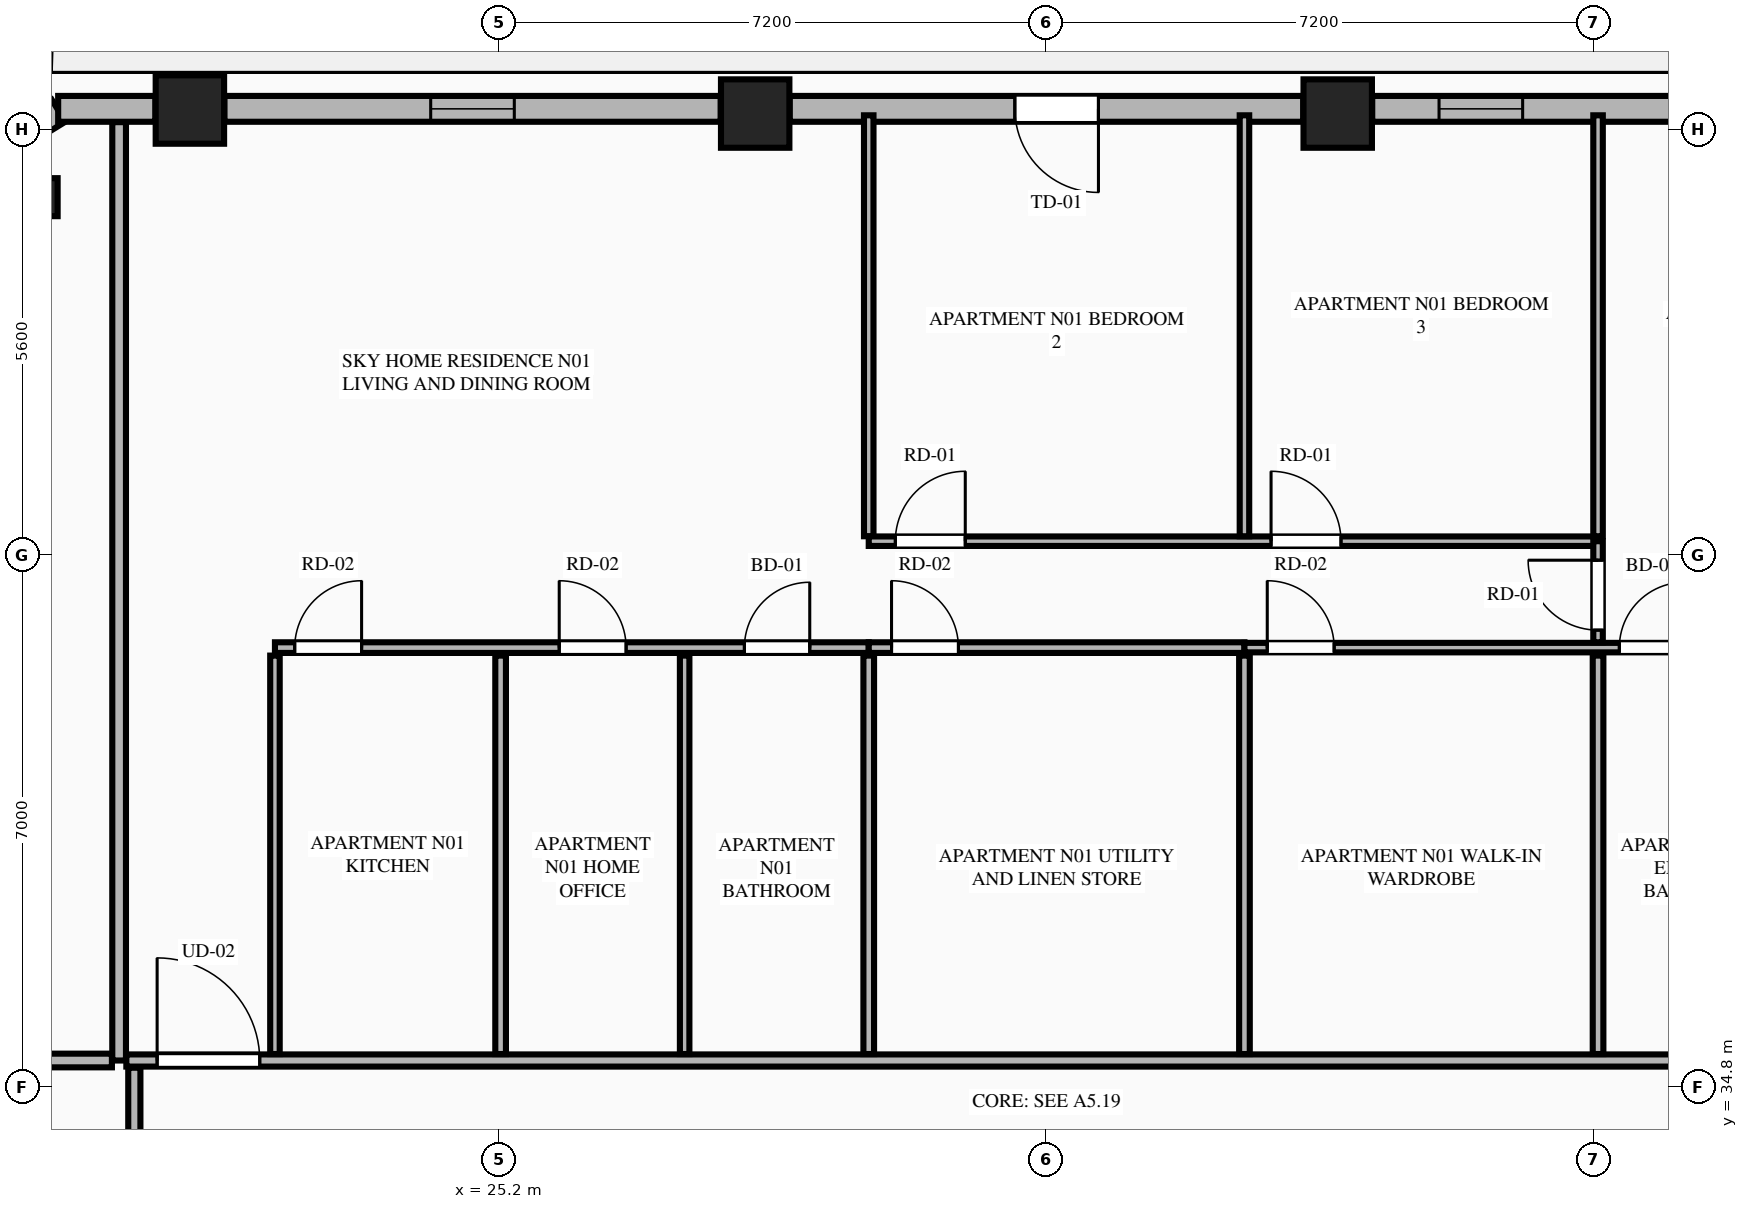
"""IFC4 building model, lengths in metres.
Left out: names, types, materials, properties, quantities, classifications, styles, units other than length and angle.
Written with IfcOpenShell. Run it as: python <this file> out.ifc"""

import sys

from ifc_helpers import new_model, si_unit, direction, frame, frame_2d, origin, origin_2d, place, context, subcontext, project, spatial, rectangle, extrude, element, fill, save


model = new_model("IFC4")
c1 = context("Model", 3, precision=1e-05, world=origin(), true_north=direction((0.0, 1.0)))
c2 = subcontext(c1, "Body", "Model", "MODEL_VIEW")
j1 = project(units=[si_unit("LENGTHUNIT", "METRE"), si_unit("PLANEANGLEUNIT", "RADIAN")], contexts=[c1])
p1 = place(None, origin())
s1 = spatial("IfcSite", under=j1, at=p1, CompositionType="ELEMENT")
p2 = place(p1, origin())
s2 = spatial("IfcBuilding", under=s1, at=p2, CompositionType="ELEMENT")
p3 = place(p2, frame((0.0, 0.0, 164.15)))
s3 = spatial("IfcBuildingStorey", under=s2, at=p3, CompositionType="ELEMENT", Elevation=164.15)
for number, where, z_axis, x_axis in (
    (1, (36.232, 47.608, 0.0), (0.0, 0.0, 1.0), (1.0, 0.0, 0.0)),
    (2, (28.568, 47.608, 0.0), (0.0, 0.0, 1.0), (1.0, 0.0, 0.0)),
    (3, (21.131, 47.661, 0.0), (0.0, 0.0, 1.0), (1.0, 0.0, 0.0)),
):
    element("IfcColumn", number, at=place(p3, frame(where, z_axis=z_axis, x_axis=x_axis)), inside=s3, PredefinedType="COLUMN", context=c2, shape_type="SweptSolid", body=[
        extrude(rectangle(XDim=0.9, YDim=0.9, at=origin_2d()), origin(), (0.0, 0.0, 1.0), 3.55),
    ])
p4 = place(p3, frame((19.141, 46.508, 0.0), z_axis=(0.0, 0.0, 1.0), x_axis=(-0.865160173452, -0.501495637342, 0.0)))
e4 = element("IfcColumn", 4, at=p4, inside=s3, PredefinedType="PILASTER", context=c2, shape_type="SweptSolid", body=[
    extrude(rectangle(XDim=0.5, YDim=0.35, at=origin_2d()), origin(), (0.0, 0.0, 1.0), 3.55),
])
p5 = place(p3, frame((19.403, 47.645, 0.0), z_axis=(0.0, 0.0, 1.0), x_axis=(-0.851798915137, -0.523868884523, 0.0)))
e5 = element("IfcWall", 5, at=p5, inside=s3, PredefinedType="STANDARD", context=c2, shape_type="SweptSolid", body=[
    extrude(rectangle(XDim=1.848, YDim=0.34, at=frame_2d((0.924, 0.0))), origin(), (0.0, 0.0, 1.0), 3.34),
])
p6 = place(p3, frame((43.215, 47.67, 0.0), z_axis=(0.0, 0.0, 1.0), x_axis=(-1.0, 0.0, 0.0)))
e6 = element("IfcWall", 6, at=p6, inside=s3, PredefinedType="STANDARD", context=c2, shape_type="SweptSolid", body=[
    extrude(rectangle(XDim=6.529, YDim=0.34, at=frame_2d((3.265, 0.0))), origin(), (0.0, 0.0, 1.0), 2.797),
])
p7 = place(p6, frame((1.173, 0.0, 0.75)))
e7 = element("IfcOpeningElement", 7, at=p7, cuts=e6, PredefinedType="OPENING", context=c2, shape_type="SweptSolid", body=[
    extrude(rectangle(XDim=1.1, YDim=1.897, at=frame_2d((0.55, 0.948))), frame((0.0, 0.18, 0.0), z_axis=(0.0, -1.0, 0.0), x_axis=(1.0, 0.0, 0.0)), (0.0, 0.0, 1.0), 0.36),
])
p8 = place(p6, frame((4.55, 0.0, 0.75)))
e8 = element("IfcOpeningElement", 8, at=p8, cuts=e6, PredefinedType="OPENING", context=c2, shape_type="SweptSolid", body=[
    extrude(rectangle(XDim=1.1, YDim=1.897, at=frame_2d((0.55, 0.948))), frame((0.0, 0.18, 0.0), z_axis=(0.0, -1.0, 0.0), x_axis=(1.0, 0.0, 0.0)), (0.0, 0.0, 1.0), 0.36),
])
p9 = place(p3, frame((35.778, 47.67, 0.0), z_axis=(0.0, 0.0, 1.0), x_axis=(-1.0, 0.0, 0.0)))
e9 = element("IfcWall", 9, at=p9, inside=s3, PredefinedType="STANDARD", context=c2, shape_type="SweptSolid", body=[
    extrude(rectangle(XDim=6.756, YDim=0.34, at=frame_2d((3.378, 0.0))), origin(), (0.0, 0.0, 1.0), 2.797),
])
p10 = place(p9, frame((2.694, 0.0, 0.0)))
e10 = element("IfcOpeningElement", 10, at=p10, cuts=e9, PredefinedType="OPENING", context=c2, shape_type="SweptSolid", body=[
    extrude(rectangle(XDim=1.1, YDim=2.25, at=frame_2d((0.55, 1.125))), frame((0.0, 0.18, 0.0), z_axis=(0.0, -1.0, 0.0), x_axis=(1.0, 0.0, 0.0)), (0.0, 0.0, 1.0), 0.36),
])
p11 = place(p3, frame((28.114, 47.67, 0.0), z_axis=(0.0, 0.0, 1.0), x_axis=(-1.0, 0.0, 0.0)))
e11 = element("IfcWall", 11, at=p11, inside=s3, PredefinedType="STANDARD", context=c2, shape_type="SweptSolid", body=[
    extrude(rectangle(XDim=6.529, YDim=0.34, at=frame_2d((3.265, 0.0))), origin(), (0.0, 0.0, 1.0), 2.797),
])
p12 = place(p11, frame((2.715, 0.0, 0.75)))
e12 = element("IfcOpeningElement", 12, at=p12, cuts=e11, PredefinedType="OPENING", context=c2, shape_type="SweptSolid", body=[
    extrude(rectangle(XDim=1.1, YDim=1.897, at=frame_2d((0.55, 0.948))), frame((0.0, 0.18, 0.0), z_axis=(0.0, -1.0, 0.0), x_axis=(1.0, 0.0, 0.0)), (0.0, 0.0, 1.0), 0.36),
])
p13 = place(p3, frame((20.677, 47.67, 0.0), z_axis=(0.0, 0.0, 1.0), x_axis=(-1.0, 0.0, 0.0)))
e13 = element("IfcWall", 13, at=p13, inside=s3, PredefinedType="STANDARD", context=c2, shape_type="SweptSolid", body=[
    extrude(rectangle(XDim=1.279, YDim=0.34, at=frame_2d((0.64, 0.0))), origin(), (0.0, 0.0, 1.0), 3.34),
])
p14 = place(p3, frame((20.2, 35.15, 0.0), z_axis=(0.0, 0.0, 1.0), x_axis=(0.0, 1.0, 0.0)))
e14 = element("IfcWall", 14, at=p14, inside=s3, PredefinedType="PARTITIONING", context=c2, shape_type="SweptSolid", body=[
    extrude(rectangle(XDim=12.345, YDim=0.18, at=frame_2d((6.173, 0.0))), origin(), (0.0, 0.0, 1.0), 3.34),
])
p15 = place(p3, frame((20.295, 35.15, 0.0), z_axis=(0.0, 0.0, 1.0), x_axis=(1.0, 0.0, 0.0)))
e15 = element("IfcWall", 15, at=p15, inside=s3, PredefinedType="PARTITIONING", context=c2, shape_type="SweptSolid", body=[
    extrude(rectangle(XDim=24.21, YDim=0.16, at=frame_2d((12.105, 0.0))), origin(), (0.0, 0.0, 1.0), 3.34),
])
p16 = place(p15, frame((0.405, 0.0, 0.0)))
e16 = element("IfcOpeningElement", 16, at=p16, cuts=e15, PredefinedType="OPENING", context=c2, shape_type="SweptSolid", body=[
    extrude(rectangle(XDim=1.35, YDim=2.35, at=frame_2d((0.675, 1.175))), frame((0.0, 0.09, 0.0), z_axis=(0.0, -1.0, 0.0), x_axis=(1.0, 0.0, 0.0)), (0.0, 0.0, 1.0), 0.18),
])
p17 = place(p3, frame((22.25, 35.235, 0.0), z_axis=(0.0, 0.0, 1.0), x_axis=(0.0, 1.0, 0.0)))
e17 = element("IfcWall", 17, at=p17, inside=s3, PredefinedType="PARTITIONING", context=c2, shape_type="SweptSolid", body=[
    extrude(rectangle(XDim=5.242, YDim=0.125, at=frame_2d((2.621, 0.0))), origin(), (0.0, 0.0, 1.0), 2.722),
])
p18 = place(p3, frame((22.25, 40.582, 0.0), z_axis=(0.0, 0.0, 1.0), x_axis=(1.0, 0.0, 0.0)))
e18 = element("IfcWall", 18, at=p18, inside=s3, PredefinedType="PLUMBINGWALL", context=c2, shape_type="SweptSolid", body=[
    extrude(rectangle(XDim=7.812, YDim=0.14, at=frame_2d((3.906, 0.0))), origin(), (0.0, 0.0, 1.0), 3.34),
])
p19 = place(p18, frame((6.176, 0.0, 0.0)))
e19 = element("IfcOpeningElement", 19, at=p19, cuts=e18, PredefinedType="OPENING", context=c2, shape_type="SweptSolid", body=[
    extrude(rectangle(XDim=0.86, YDim=2.1, at=frame_2d((0.43, 1.05))), frame((0.0, 0.08, 0.0), z_axis=(0.0, -1.0, 0.0), x_axis=(1.0, 0.0, 0.0)), (0.0, 0.0, 1.0), 0.16),
])
p20 = place(p18, frame((0.26, 0.0, 0.0)))
e20 = element("IfcOpeningElement", 20, at=p20, cuts=e18, PredefinedType="OPENING", context=c2, shape_type="SweptSolid", body=[
    extrude(rectangle(XDim=0.88, YDim=2.15, at=frame_2d((0.44, 1.075))), frame((0.0, 0.08, 0.0), z_axis=(0.0, -1.0, 0.0), x_axis=(1.0, 0.0, 0.0)), (0.0, 0.0, 1.0), 0.16),
])
p21 = place(p18, frame((3.74, 0.0, 0.0)))
e21 = element("IfcOpeningElement", 21, at=p21, cuts=e18, PredefinedType="OPENING", context=c2, shape_type="SweptSolid", body=[
    extrude(rectangle(XDim=0.88, YDim=2.15, at=frame_2d((0.44, 1.075))), frame((0.0, 0.08, 0.0), z_axis=(0.0, -1.0, 0.0), x_axis=(1.0, 0.0, 0.0)), (0.0, 0.0, 1.0), 0.16),
])
p22 = place(p3, frame((30.062, 40.582, 0.0), z_axis=(0.0, 0.0, 1.0), x_axis=(1.0, 0.0, 0.0)))
e22 = element("IfcWall", 22, at=p22, inside=s3, PredefinedType="PLUMBINGWALL", context=c2, shape_type="SweptSolid", body=[
    extrude(rectangle(XDim=4.943, YDim=0.14, at=frame_2d((2.471, 0.0))), origin(), (0.0, 0.0, 1.0), 3.34),
])
p23 = place(p22, frame((0.3, 0.0, 0.0)))
e23 = element("IfcOpeningElement", 23, at=p23, cuts=e22, PredefinedType="OPENING", context=c2, shape_type="SweptSolid", body=[
    extrude(rectangle(XDim=0.88, YDim=2.15, at=frame_2d((0.44, 1.075))), frame((0.0, 0.08, 0.0), z_axis=(0.0, -1.0, 0.0), x_axis=(1.0, 0.0, 0.0)), (0.0, 0.0, 1.0), 0.16),
])
p24 = place(p3, frame((35.005, 40.582, 0.0), z_axis=(0.0, 0.0, 1.0), x_axis=(1.0, 0.0, 0.0)))
e24 = element("IfcWall", 24, at=p24, inside=s3, PredefinedType="PARTITIONING", context=c2, shape_type="SweptSolid", body=[
    extrude(rectangle(XDim=9.5, YDim=0.125, at=frame_2d((4.75, 0.0))), origin(), (0.0, 0.0, 1.0), 3.34),
])
p25 = place(p24, frame((4.932, 0.0, 0.0)))
e25 = element("IfcOpeningElement", 25, at=p25, cuts=e24, PredefinedType="OPENING", context=c2, shape_type="SweptSolid", body=[
    extrude(rectangle(XDim=0.86, YDim=2.1, at=frame_2d((0.43, 1.05))), frame((0.0, 0.073, 0.0), z_axis=(0.0, -1.0, 0.0), x_axis=(1.0, 0.0, 0.0)), (0.0, 0.0, 1.0), 0.145),
])
p26 = place(p24, frame((7.55, 0.0, 0.0)))
e26 = element("IfcOpeningElement", 26, at=p26, cuts=e24, PredefinedType="OPENING", context=c2, shape_type="SweptSolid", body=[
    extrude(rectangle(XDim=0.88, YDim=2.15, at=frame_2d((0.44, 1.075))), frame((0.0, 0.073, 0.0), z_axis=(0.0, -1.0, 0.0), x_axis=(1.0, 0.0, 0.0)), (0.0, 0.0, 1.0), 0.145),
])
p27 = place(p24, frame((0.3, 0.0, 0.0)))
e27 = element("IfcOpeningElement", 27, at=p27, cuts=e24, PredefinedType="OPENING", context=c2, shape_type="SweptSolid", body=[
    extrude(rectangle(XDim=0.88, YDim=2.15, at=frame_2d((0.44, 1.075))), frame((0.0, 0.073, 0.0), z_axis=(0.0, -1.0, 0.0), x_axis=(1.0, 0.0, 0.0)), (0.0, 0.0, 1.0), 0.145),
])
p28 = place(p3, frame((25.219, 35.235, 0.0), z_axis=(0.0, 0.0, 1.0), x_axis=(0.0, 1.0, 0.0)))
e28 = element("IfcWall", 28, at=p28, inside=s3, PredefinedType="PLUMBINGWALL", context=c2, shape_type="SweptSolid", body=[
    extrude(rectangle(XDim=5.242, YDim=0.14, at=frame_2d((2.621, 0.0))), origin(), (0.0, 0.0, 1.0), 3.34),
])
p29 = place(p3, frame((27.64, 35.235, 0.0), z_axis=(0.0, 0.0, 1.0), x_axis=(0.0, 1.0, 0.0)))
e29 = element("IfcWall", 29, at=p29, inside=s3, PredefinedType="PARTITIONING", context=c2, shape_type="SweptSolid", body=[
    extrude(rectangle(XDim=5.242, YDim=0.125, at=frame_2d((2.621, 0.0))), origin(), (0.0, 0.0, 1.0), 3.34),
])
p30 = place(p3, frame((30.062, 42.047, 0.0), z_axis=(0.0, 0.0, 1.0), x_axis=(0.0, 1.0, 0.0)))
e30 = element("IfcWall", 30, at=p30, inside=s3, PredefinedType="PARTITIONING", context=c2, shape_type="SweptSolid", body=[
    extrude(rectangle(XDim=5.538, YDim=0.125, at=frame_2d((2.769, 0.0))), origin(), (0.0, 0.0, 1.0), 3.34),
])
p31 = place(p3, frame((30.062, 41.982, 0.0), z_axis=(0.0, 0.0, 1.0), x_axis=(1.0, 0.0, 0.0)))
e31 = element("IfcWall", 31, at=p31, inside=s3, PredefinedType="PARTITIONING", context=c2, shape_type="SweptSolid", body=[
    extrude(rectangle(XDim=9.595, YDim=0.125, at=frame_2d((4.797, 0.0))), origin(), (0.0, 0.0, 1.0), 3.34),
])
p32 = place(p31, frame((0.35, 0.0, 0.0)))
e32 = element("IfcOpeningElement", 32, at=p32, cuts=e31, PredefinedType="OPENING", context=c2, shape_type="SweptSolid", body=[
    extrude(rectangle(XDim=0.92, YDim=2.15, at=frame_2d((0.46, 1.075))), frame((0.0, 0.073, 0.0), z_axis=(0.0, -1.0, 0.0), x_axis=(1.0, 0.0, 0.0)), (0.0, 0.0, 1.0), 0.145),
])
p33 = place(p31, frame((5.293, 0.0, 0.0)))
e33 = element("IfcOpeningElement", 33, at=p33, cuts=e31, PredefinedType="OPENING", context=c2, shape_type="SweptSolid", body=[
    extrude(rectangle(XDim=0.92, YDim=2.15, at=frame_2d((0.46, 1.075))), frame((0.0, 0.073, 0.0), z_axis=(0.0, -1.0, 0.0), x_axis=(1.0, 0.0, 0.0)), (0.0, 0.0, 1.0), 0.145),
])
p34 = place(p3, frame((39.657, 40.652, 0.0), z_axis=(0.0, 0.0, 1.0), x_axis=(0.0, 1.0, 0.0)))
e34 = element("IfcWall", 34, at=p34, inside=s3, PredefinedType="PARTITIONING", context=c2, shape_type="SweptSolid", body=[
    extrude(rectangle(XDim=1.33, YDim=0.125, at=frame_2d((0.665, 0.0))), origin(), (0.0, 0.0, 1.0), 3.34),
])
p35 = place(p34, frame((0.16, 0.0, 0.0)))
e35 = element("IfcOpeningElement", 35, at=p35, cuts=e34, PredefinedType="OPENING", context=c2, shape_type="SweptSolid", body=[
    extrude(rectangle(XDim=0.92, YDim=2.15, at=frame_2d((0.46, 1.075))), frame((0.0, 0.073, 0.0), z_axis=(0.0, -1.0, 0.0), x_axis=(1.0, 0.0, 0.0)), (0.0, 0.0, 1.0), 0.145),
])
for number, where, z_axis, x_axis in (
    (36, (30.062, 35.235, 0.0), (0.0, 0.0, 1.0), (0.0, 1.0, 0.0)),
    (37, (35.005, 35.235, 0.0), (0.0, 0.0, 1.0), (0.0, 1.0, 0.0)),
):
    element("IfcWall", number, at=place(p3, frame(where, z_axis=z_axis, x_axis=x_axis)), inside=s3, PredefinedType="PLUMBINGWALL", context=c2, shape_type="SweptSolid", body=[
        extrude(rectangle(XDim=5.242, YDim=0.14, at=frame_2d((2.621, 0.0))), origin(), (0.0, 0.0, 1.0), 3.34),
    ])
for number, where, z_axis, x_axis in (
    (38, (35.005, 42.047, 0.0), (0.0, 0.0, 1.0), (0.0, 1.0, 0.0)),
    (39, (39.657, 42.047, 0.0), (0.0, 0.0, 1.0), (0.0, 1.0, 0.0)),
):
    element("IfcWall", number, at=place(p3, frame(where, z_axis=z_axis, x_axis=x_axis)), inside=s3, PredefinedType="PARTITIONING", context=c2, shape_type="SweptSolid", body=[
        extrude(rectangle(XDim=5.538, YDim=0.125, at=frame_2d((2.769, 0.0))), origin(), (0.0, 0.0, 1.0), 3.34),
    ])
p36 = place(p3, frame((39.657, 35.235, 0.0), z_axis=(0.0, 0.0, 1.0), x_axis=(0.0, 1.0, 0.0)))
e40 = element("IfcWall", 40, at=p36, inside=s3, PredefinedType="PLUMBINGWALL", context=c2, shape_type="SweptSolid", body=[
    extrude(rectangle(XDim=5.242, YDim=0.14, at=frame_2d((2.621, 0.0))), origin(), (0.0, 0.0, 1.0), 3.34),
])
p37 = place(p3, frame((12.21, 35.15, 0.0), z_axis=(0.0, 0.0, 1.0), x_axis=(1.0, 0.0, 0.0)))
e41 = element("IfcWall", 41, at=p37, inside=s3, PredefinedType="PARTITIONING", context=c2, shape_type="SweptSolid", body=[
    extrude(rectangle(XDim=7.895, YDim=0.18, at=frame_2d((3.948, 0.0))), origin(), (0.0, 0.0, 1.0), 3.34),
])
p38 = place(p3, frame((20.4, 16.745, 0.0), z_axis=(0.0, 0.0, 1.0), x_axis=(0.0, 1.0, 0.0)))
e42 = element("IfcWall", 42, at=p38, inside=s3, PredefinedType="PARTITIONING", context=c2, shape_type="SweptSolid", body=[
    extrude(rectangle(XDim=18.31, YDim=0.16, at=frame_2d((9.155, 0.0))), origin(), (0.0, 0.0, 1.0), 3.34),
])
p39 = place(p38, frame((0.4, 0.0, 0.0)))
e43 = element("IfcOpeningElement", 43, at=p39, cuts=e42, PredefinedType="OPENING", context=c2, shape_type="SweptSolid", body=[
    extrude(rectangle(XDim=1.02, YDim=2.25, at=frame_2d((0.51, 1.125))), frame((0.0, 0.09, 0.0), z_axis=(0.0, -1.0, 0.0), x_axis=(1.0, 0.0, 0.0)), (0.0, 0.0, 1.0), 0.18),
])
p40 = place(p10, origin())
e44 = element("IfcDoor", 44, at=p40, inside=s3, OperationType="SINGLE_SWING_LEFT", PredefinedType="DOOR", context=c2, shape_type="SweptSolid", body=[
    extrude(rectangle(XDim=1.1, YDim=2.25, at=frame_2d((0.55, 1.125))), frame((0.0, 0.025, 0.0), z_axis=(0.0, -1.0, 0.0), x_axis=(1.0, 0.0, 0.0)), (0.0, 0.0, 1.0), 0.05),
])
fill(e10, e44)
p41 = place(p12, origin())
e45 = element("IfcWindow", 45, at=p41, inside=s3, PartitioningType="SINGLE_PANEL", PredefinedType="WINDOW", context=c2, shape_type="SweptSolid", body=[
    extrude(rectangle(XDim=1.1, YDim=1.897, at=frame_2d((0.55, 0.948))), frame((0.0, 0.03, 0.0), z_axis=(0.0, -1.0, 0.0), x_axis=(1.0, 0.0, 0.0)), (0.0, 0.0, 1.0), 0.06),
])
fill(e12, e45)
p42 = place(p19, origin())
e46 = element("IfcDoor", 46, at=p42, inside=s3, OperationType="SINGLE_SWING_RIGHT", PredefinedType="DOOR", context=c2, shape_type="SweptSolid", body=[
    extrude(rectangle(XDim=0.86, YDim=2.1, at=frame_2d((0.43, 1.05))), frame((0.0, 0.025, 0.0), z_axis=(0.0, -1.0, 0.0), x_axis=(1.0, 0.0, 0.0)), (0.0, 0.0, 1.0), 0.05),
])
fill(e19, e46)
p43 = place(p25, origin())
e47 = element("IfcDoor", 47, at=p43, inside=s3, OperationType="SINGLE_SWING_RIGHT", PredefinedType="DOOR", context=c2, shape_type="SweptSolid", body=[
    extrude(rectangle(XDim=0.86, YDim=2.1, at=frame_2d((0.43, 1.05))), frame((0.0, 0.025, 0.0), z_axis=(0.0, -1.0, 0.0), x_axis=(1.0, 0.0, 0.0)), (0.0, 0.0, 1.0), 0.05),
])
fill(e25, e47)
p44 = place(p16, origin())
e48 = element("IfcDoor", 48, at=p44, inside=s3, OperationType="SINGLE_SWING_LEFT", PredefinedType="DOOR", context=c2, shape_type="SweptSolid", body=[
    extrude(rectangle(XDim=1.35, YDim=2.35, at=frame_2d((0.675, 1.175))), frame((0.0, 0.025, 0.0), z_axis=(0.0, -1.0, 0.0), x_axis=(1.0, 0.0, 0.0)), (0.0, 0.0, 1.0), 0.05),
])
fill(e16, e48)
p45 = place(p20, origin())
e49 = element("IfcDoor", 49, at=p45, inside=s3, OperationType="SINGLE_SWING_RIGHT", PredefinedType="DOOR", context=c2, shape_type="SweptSolid", body=[
    extrude(rectangle(XDim=0.88, YDim=2.15, at=frame_2d((0.44, 1.075))), frame((0.0, 0.025, 0.0), z_axis=(0.0, -1.0, 0.0), x_axis=(1.0, 0.0, 0.0)), (0.0, 0.0, 1.0), 0.05),
])
fill(e20, e49)
p46 = place(p21, origin())
e50 = element("IfcDoor", 50, at=p46, inside=s3, OperationType="SINGLE_SWING_LEFT", PredefinedType="DOOR", context=c2, shape_type="SweptSolid", body=[
    extrude(rectangle(XDim=0.88, YDim=2.15, at=frame_2d((0.44, 1.075))), frame((0.0, 0.025, 0.0), z_axis=(0.0, -1.0, 0.0), x_axis=(1.0, 0.0, 0.0)), (0.0, 0.0, 1.0), 0.05),
])
fill(e21, e50)
p47 = place(p23, origin())
e51 = element("IfcDoor", 51, at=p47, inside=s3, OperationType="SINGLE_SWING_LEFT", PredefinedType="DOOR", context=c2, shape_type="SweptSolid", body=[
    extrude(rectangle(XDim=0.88, YDim=2.15, at=frame_2d((0.44, 1.075))), frame((0.0, 0.025, 0.0), z_axis=(0.0, -1.0, 0.0), x_axis=(1.0, 0.0, 0.0)), (0.0, 0.0, 1.0), 0.05),
])
fill(e23, e51)
p48 = place(p32, origin())
e52 = element("IfcDoor", 52, at=p48, inside=s3, OperationType="SINGLE_SWING_RIGHT", PredefinedType="DOOR", context=c2, shape_type="SweptSolid", body=[
    extrude(rectangle(XDim=0.92, YDim=2.15, at=frame_2d((0.46, 1.075))), frame((0.0, 0.025, 0.0), z_axis=(0.0, -1.0, 0.0), x_axis=(1.0, 0.0, 0.0)), (0.0, 0.0, 1.0), 0.05),
])
fill(e32, e52)
p49 = place(p33, origin())
e53 = element("IfcDoor", 53, at=p49, inside=s3, OperationType="SINGLE_SWING_LEFT", PredefinedType="DOOR", context=c2, shape_type="SweptSolid", body=[
    extrude(rectangle(XDim=0.92, YDim=2.15, at=frame_2d((0.46, 1.075))), frame((0.0, 0.025, 0.0), z_axis=(0.0, -1.0, 0.0), x_axis=(1.0, 0.0, 0.0)), (0.0, 0.0, 1.0), 0.05),
])
fill(e33, e53)
p50 = place(p35, origin())
e54 = element("IfcDoor", 54, at=p50, inside=s3, OperationType="SINGLE_SWING_RIGHT", PredefinedType="DOOR", context=c2, shape_type="SweptSolid", body=[
    extrude(rectangle(XDim=0.92, YDim=2.15, at=frame_2d((0.46, 1.075))), frame((0.0, 0.025, 0.0), z_axis=(0.0, -1.0, 0.0), x_axis=(1.0, 0.0, 0.0)), (0.0, 0.0, 1.0), 0.05),
])
fill(e35, e54)
p51 = place(p27, origin())
e55 = element("IfcDoor", 55, at=p51, inside=s3, OperationType="SINGLE_SWING_LEFT", PredefinedType="DOOR", context=c2, shape_type="SweptSolid", body=[
    extrude(rectangle(XDim=0.88, YDim=2.15, at=frame_2d((0.44, 1.075))), frame((0.0, 0.025, 0.0), z_axis=(0.0, -1.0, 0.0), x_axis=(1.0, 0.0, 0.0)), (0.0, 0.0, 1.0), 0.05),
])
fill(e27, e55)
p52 = place(p8, origin())
e56 = element("IfcWindow", 56, at=p52, inside=s3, PartitioningType="SINGLE_PANEL", PredefinedType="WINDOW", context=c2, shape_type="SweptSolid", body=[
    extrude(rectangle(XDim=1.1, YDim=1.897, at=frame_2d((0.55, 0.948))), frame((0.0, 0.03, 0.0), z_axis=(0.0, -1.0, 0.0), x_axis=(1.0, 0.0, 0.0)), (0.0, 0.0, 1.0), 0.06),
])
fill(e8, e56)
save(model, sys.argv[1])
